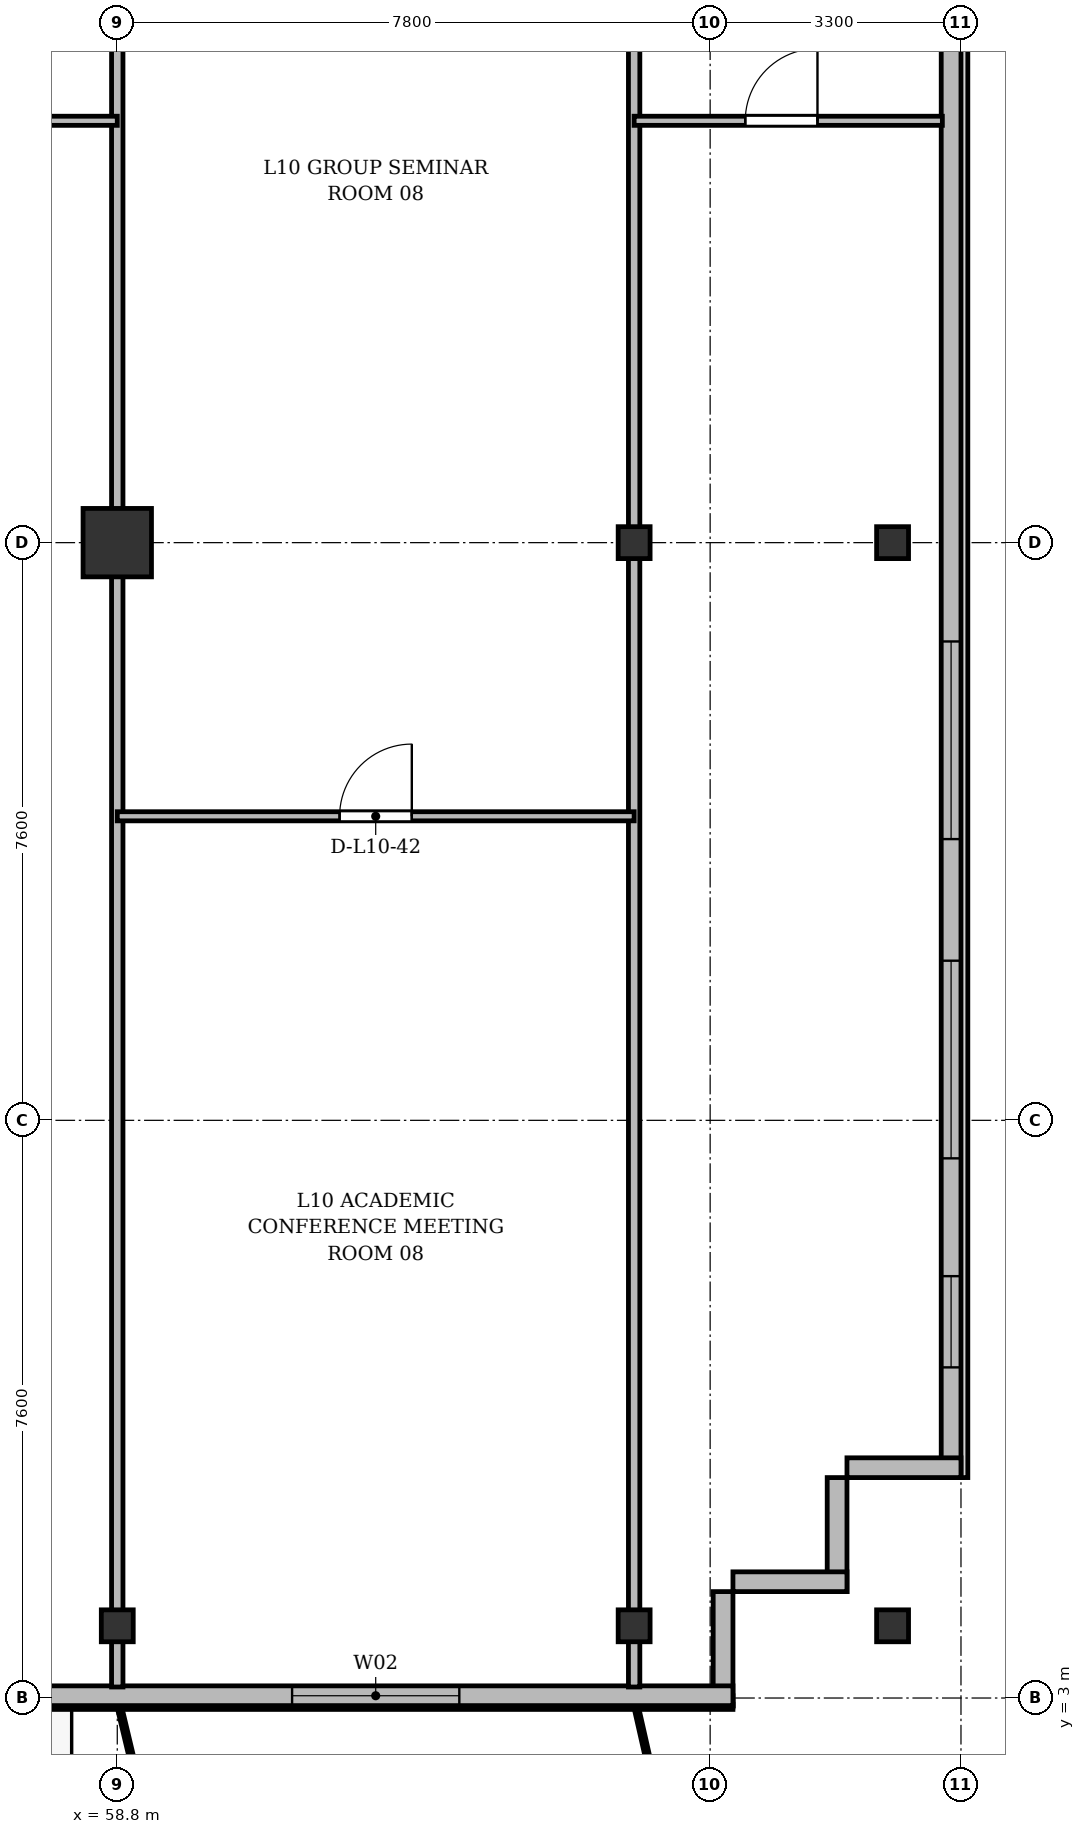
"""IFC4 building model, lengths in metres.
Left out: names, types, materials, properties, quantities, classifications, styles, units other than length and angle.
Written with IfcOpenShell. Run it as: python <this file> out.ifc"""

import sys

from ifc_helpers import new_model, si_unit, direction, frame, frame_2d, origin, origin_2d, place, context, subcontext, project, spatial, rectangle, i_section, extrude, source, transform, mapped, element, fill, save


model = new_model("IFC4")
c1 = context("Model", 3, precision=1e-05, world=origin(), true_north=direction((0.0, 1.0)))
c2 = subcontext(c1, "Body", "Model", "MODEL_VIEW")
j1 = project(units=[si_unit("LENGTHUNIT", "METRE"), si_unit("PLANEANGLEUNIT", "RADIAN")], contexts=[c1])
p1 = place(None, origin())
s1 = spatial("IfcSite", under=j1, at=p1, CompositionType="ELEMENT")
p2 = place(p1, origin())
s2 = spatial("IfcBuilding", under=s1, at=p2, CompositionType="ELEMENT")
p3 = place(p2, frame((0.0, 0.0, 41.5)))
s3 = spatial("IfcBuildingStorey", under=s2, at=p3, CompositionType="ELEMENT", Elevation=41.5)
m1 = source(origin(), c2, "Body", "SweptSolid", [
    extrude(i_section(OverallWidth=0.42, OverallDepth=0.42, WebThickness=0.026, FlangeThickness=0.04, at=origin_2d()), origin(), (0.0, 0.0, 1.0), 3.6),
])
p4 = place(p3, frame((58.8, 3.95, 0.0), z_axis=(0.0, 0.0, 1.0), x_axis=(1.0, 0.0, 0.0)))
e1 = element("IfcColumn", 1, at=p4, inside=s3, PredefinedType="COLUMN", context=c2, shape_type="MappedRepresentation", body=[
    mapped(m1, transform((0.0, 0.0, 0.0), x_axis=(1.0, 0.0, 0.0), y_axis=(0.0, 1.0, 0.0), z_axis=(0.0, 0.0, 1.0), scale=1.0)),
])
m2 = source(origin(), c2, "Body", "SweptSolid", [
    extrude(rectangle(XDim=0.9, YDim=0.9, at=origin_2d()), origin(), (0.0, 0.0, 1.0), 3.6),
])
p5 = place(p3, frame((58.8, 18.2, 0.0), z_axis=(0.0, 0.0, 1.0), x_axis=(1.0, 0.0, 0.0)))
e2 = element("IfcColumn", 2, at=p5, inside=s3, PredefinedType="COLUMN", context=c2, shape_type="MappedRepresentation", body=[
    mapped(m2, transform((0.0, 0.0, 0.0), x_axis=(1.0, 0.0, 0.0), y_axis=(0.0, 1.0, 0.0), z_axis=(0.0, 0.0, 1.0), scale=1.0)),
])
for number, where, z_axis, x_axis in (
    (3, (65.6, 3.95, 0.0), (0.0, 0.0, 1.0), (1.0, 0.0, 0.0)),
    (4, (65.6, 18.2, 0.0), (0.0, 0.0, 1.0), (1.0, 0.0, 0.0)),
    (5, (69.0, 3.95, 0.0), (0.0, 0.0, 1.0), (1.0, 0.0, 0.0)),
    (6, (69.0, 18.2, 0.0), (0.0, 0.0, 1.0), (1.0, 0.0, 0.0)),
):
    element("IfcColumn", number, at=place(p3, frame(where, z_axis=z_axis, x_axis=x_axis)), inside=s3, PredefinedType="COLUMN", context=c2, shape_type="MappedRepresentation", body=[
        mapped(m1, transform((0.0, 0.0, 0.0), x_axis=(1.0, 0.0, 0.0), y_axis=(0.0, 1.0, 0.0), z_axis=(0.0, 0.0, 1.0), scale=1.0)),
    ])
p6 = place(p3, frame((69.77, 45.5, 0.0), z_axis=(0.0, 0.0, 1.0), x_axis=(0.0, -1.0, 0.0)))
e7 = element("IfcWall", 7, at=p6, inside=s3, PredefinedType="SOLIDWALL", context=c2, shape_type="SweptSolid", body=[
    extrude(rectangle(XDim=39.6, YDim=0.26, at=frame_2d((19.8, 0.0))), origin(), (0.0, 0.0, 1.0), 3.34),
])
p7 = place(p6, frame((36.95, 0.0, 0.92)))
e8 = element("IfcOpeningElement", 8, at=p7, cuts=e7, PredefinedType="OPENING", context=c2, shape_type="SweptSolid", body=[
    extrude(rectangle(XDim=1.2, YDim=1.65, at=frame_2d((0.6, 0.825))), frame((0.0, 0.14, 0.0), z_axis=(0.0, -1.0, 0.0), x_axis=(1.0, 0.0, 0.0)), (0.0, 0.0, 1.0), 0.28),
])
p8 = place(p6, frame((32.8, 0.0, 0.92)))
e9 = element("IfcOpeningElement", 9, at=p8, cuts=e7, PredefinedType="OPENING", context=c2, shape_type="SweptSolid", body=[
    extrude(rectangle(XDim=2.6, YDim=1.9, at=frame_2d((1.3, 0.95))), frame((0.0, 0.14, 0.0), z_axis=(0.0, -1.0, 0.0), x_axis=(1.0, 0.0, 0.0)), (0.0, 0.0, 1.0), 0.28),
])
p9 = place(p6, frame((28.6, 0.0, 0.92)))
e10 = element("IfcOpeningElement", 10, at=p9, cuts=e7, PredefinedType="OPENING", context=c2, shape_type="SweptSolid", body=[
    extrude(rectangle(XDim=2.6, YDim=1.9, at=frame_2d((1.3, 0.95))), frame((0.0, 0.14, 0.0), z_axis=(0.0, -1.0, 0.0), x_axis=(1.0, 0.0, 0.0)), (0.0, 0.0, 1.0), 0.28),
])
p10 = place(p6, frame((7.4, 0.0, 0.92)))
e11 = element("IfcOpeningElement", 11, at=p10, cuts=e7, PredefinedType="OPENING", context=c2, shape_type="SweptSolid", body=[
    extrude(rectangle(XDim=2.6, YDim=1.9, at=frame_2d((1.3, 0.95))), frame((0.0, 0.14, 0.0), z_axis=(0.0, -1.0, 0.0), x_axis=(1.0, 0.0, 0.0)), (0.0, 0.0, 1.0), 0.28),
])
p11 = place(p6, frame((4.5, 0.0, 0.92)))
e12 = element("IfcOpeningElement", 12, at=p11, cuts=e7, PredefinedType="OPENING", context=c2, shape_type="SweptSolid", body=[
    extrude(rectangle(XDim=1.2, YDim=1.65, at=frame_2d((0.6, 0.825))), frame((0.0, 0.14, 0.0), z_axis=(0.0, -1.0, 0.0), x_axis=(1.0, 0.0, 0.0)), (0.0, 0.0, 1.0), 0.28),
])
p12 = place(p6, frame((1.15, 0.0, 0.92)))
e13 = element("IfcOpeningElement", 13, at=p12, cuts=e7, PredefinedType="OPENING", context=c2, shape_type="SweptSolid", body=[
    extrude(rectangle(XDim=1.2, YDim=1.65, at=frame_2d((0.6, 0.825))), frame((0.0, 0.14, 0.0), z_axis=(0.0, -1.0, 0.0), x_axis=(1.0, 0.0, 0.0)), (0.0, 0.0, 1.0), 0.28),
])
p13 = place(p3, frame((69.9, 6.03, 0.0), z_axis=(0.0, 0.0, 1.0), x_axis=(-1.0, 0.0, 0.0)))
e14 = element("IfcWall", 14, at=p13, inside=s3, PredefinedType="SOLIDWALL", context=c2, shape_type="SweptSolid", body=[
    extrude(rectangle(XDim=1.5, YDim=0.26, at=frame_2d((0.75, 0.0))), origin(), (0.0, 0.0, 1.0), 2.752),
])
for number, where, z_axis, x_axis in (
    (15, (68.27, 5.9, 0.0), (0.0, 0.0, 1.0), (0.0, -1.0, 0.0)),
    (16, (68.4, 4.53, 0.0), (0.0, 0.0, 1.0), (-1.0, 0.0, 0.0)),
):
    element("IfcWall", number, at=place(p3, frame(where, z_axis=z_axis, x_axis=x_axis)), inside=s3, PredefinedType="SOLIDWALL", context=c2, shape_type="SweptSolid", body=[
        extrude(rectangle(XDim=1.5, YDim=0.26, at=frame_2d((0.75, 0.0))), origin(), (0.0, 0.0, 1.0), 3.34),
    ])
p14 = place(p3, frame((66.77, 4.4, 0.0), z_axis=(0.0, 0.0, 1.0), x_axis=(0.0, -1.0, 0.0)))
e17 = element("IfcWall", 17, at=p14, inside=s3, PredefinedType="SOLIDWALL", context=c2, shape_type="SweptSolid", body=[
    extrude(rectangle(XDim=1.5, YDim=0.26, at=frame_2d((0.75, 0.0))), origin(), (0.0, 0.0, 1.0), 2.69),
])
p15 = place(p3, frame((66.9, 3.03, 0.0), z_axis=(0.0, 0.0, 1.0), x_axis=(-1.0, 0.0, 0.0)))
e18 = element("IfcWall", 18, at=p15, inside=s3, PredefinedType="SOLIDWALL", context=c2, shape_type="SweptSolid", body=[
    extrude(rectangle(XDim=59.4, YDim=0.26, at=frame_2d((29.7, 0.0))), origin(), (0.0, 0.0, 1.0), 3.34),
])
p16 = place(p15, frame((3.6, 0.0, 0.9)))
e19 = element("IfcOpeningElement", 19, at=p16, cuts=e18, PredefinedType="OPENING", context=c2, shape_type="SweptSolid", body=[
    extrude(rectangle(XDim=2.2, YDim=1.8, at=frame_2d((1.1, 0.9))), frame((0.0, 0.14, 0.0), z_axis=(0.0, -1.0, 0.0), x_axis=(1.0, 0.0, 0.0)), (0.0, 0.0, 1.0), 0.28),
])
p17 = place(p15, frame((9.565, 0.0, 0.0)))
e20 = element("IfcOpeningElement", 20, at=p17, cuts=e18, PredefinedType="OPENING", context=c2, shape_type="SweptSolid", body=[
    extrude(rectangle(XDim=1.2, YDim=2.2, at=frame_2d((0.6, 1.1))), frame((0.0, 0.14, 0.0), z_axis=(0.0, -1.0, 0.0), x_axis=(1.0, 0.0, 0.0)), (0.0, 0.0, 1.0), 0.28),
])
p18 = place(p15, frame((18.5, 0.0, 0.9)))
e21 = element("IfcOpeningElement", 21, at=p18, cuts=e18, PredefinedType="OPENING", context=c2, shape_type="SweptSolid", body=[
    extrude(rectangle(XDim=2.0, YDim=1.95, at=frame_2d((1.0, 0.975))), frame((0.0, 0.14, 0.0), z_axis=(0.0, -1.0, 0.0), x_axis=(1.0, 0.0, 0.0)), (0.0, 0.0, 1.0), 0.28),
])
p19 = place(p15, frame((28.875, 0.0, 0.9)))
e22 = element("IfcOpeningElement", 22, at=p19, cuts=e18, PredefinedType="OPENING", context=c2, shape_type="SweptSolid", body=[
    extrude(rectangle(XDim=1.65, YDim=1.85, at=frame_2d((0.825, 0.925))), frame((0.0, 0.14, 0.0), z_axis=(0.0, -1.0, 0.0), x_axis=(1.0, 0.0, 0.0)), (0.0, 0.0, 1.0), 0.28),
])
p20 = place(p15, frame((40.301, 0.0, 0.0)))
e23 = element("IfcOpeningElement", 23, at=p20, cuts=e18, PredefinedType="OPENING", context=c2, shape_type="SweptSolid", body=[
    extrude(rectangle(XDim=1.2, YDim=2.2, at=frame_2d((0.6, 1.1))), frame((0.0, 0.14, 0.0), z_axis=(0.0, -1.0, 0.0), x_axis=(1.0, 0.0, 0.0)), (0.0, 0.0, 1.0), 0.28),
])
p21 = place(p15, frame((46.3, 0.0, 0.9)))
e24 = element("IfcOpeningElement", 24, at=p21, cuts=e18, PredefinedType="OPENING", context=c2, shape_type="SweptSolid", body=[
    extrude(rectangle(XDim=2.2, YDim=1.8, at=frame_2d((1.1, 0.9))), frame((0.0, 0.14, 0.0), z_axis=(0.0, -1.0, 0.0), x_axis=(1.0, 0.0, 0.0)), (0.0, 0.0, 1.0), 0.28),
])
p22 = place(p15, frame((55.817, 0.0, 0.0)))
e25 = element("IfcOpeningElement", 25, at=p22, cuts=e18, PredefinedType="OPENING", context=c2, shape_type="SweptSolid", body=[
    extrude(rectangle(XDim=1.2, YDim=2.2, at=frame_2d((0.6, 1.1))), frame((0.0, 0.14, 0.0), z_axis=(0.0, -1.0, 0.0), x_axis=(1.0, 0.0, 0.0)), (0.0, 0.0, 1.0), 0.28),
])
for number, where, z_axis, x_axis in (
    (26, (58.8, 3.145, 0.0), (0.0, 0.0, 1.0), (0.0, 1.0, 0.0)),
    (27, (65.6, 3.145, 0.0), (0.0, 0.0, 1.0), (0.0, 1.0, 0.0)),
):
    element("IfcWall", number, at=place(p3, frame(where, z_axis=z_axis, x_axis=x_axis)), inside=s3, PredefinedType="PARTITIONING", context=c2, shape_type="SweptSolid", body=[
        extrude(rectangle(XDim=24.455, YDim=0.15, at=frame_2d((12.228, 0.0))), origin(), (0.0, 0.0, 1.0), 2.752),
    ])
p23 = place(p3, frame((51.0, 23.75, 0.0), z_axis=(0.0, 0.0, 1.0), x_axis=(1.0, 0.0, 0.0)))
e28 = element("IfcWall", 28, at=p23, inside=s3, PredefinedType="PARTITIONING", context=c2, shape_type="SweptSolid", body=[
    extrude(rectangle(XDim=7.8, YDim=0.12, at=frame_2d((3.9, 0.0))), origin(), (0.0, 0.0, 1.0), 2.752),
])
p24 = place(p23, frame((3.333, 0.0, 0.0)))
e29 = element("IfcOpeningElement", 29, at=p24, cuts=e28, PredefinedType="OPENING", context=c2, shape_type="SweptSolid", body=[
    extrude(rectangle(XDim=0.95, YDim=2.15, at=frame_2d((0.475, 1.075))), frame((0.0, 0.07, 0.0), z_axis=(0.0, -1.0, 0.0), x_axis=(1.0, 0.0, 0.0)), (0.0, 0.0, 1.0), 0.14),
])
p25 = place(p3, frame((58.8, 14.6, 0.0), z_axis=(0.0, 0.0, 1.0), x_axis=(1.0, 0.0, 0.0)))
e30 = element("IfcWall", 30, at=p25, inside=s3, PredefinedType="PARTITIONING", context=c2, shape_type="SweptSolid", body=[
    extrude(rectangle(XDim=6.8, YDim=0.12, at=frame_2d((3.4, 0.0))), origin(), (0.0, 0.0, 1.0), 2.752),
])
p26 = place(p25, frame((2.925, 0.0, 0.0)))
e31 = element("IfcOpeningElement", 31, at=p26, cuts=e30, PredefinedType="OPENING", context=c2, shape_type="SweptSolid", body=[
    extrude(rectangle(XDim=0.95, YDim=2.15, at=frame_2d((0.475, 1.075))), frame((0.0, 0.07, 0.0), z_axis=(0.0, -1.0, 0.0), x_axis=(1.0, 0.0, 0.0)), (0.0, 0.0, 1.0), 0.14),
])
p27 = place(p3, frame((65.6, 23.75, 0.0), z_axis=(0.0, 0.0, 1.0), x_axis=(1.0, 0.0, 0.0)))
e32 = element("IfcWall", 32, at=p27, inside=s3, PredefinedType="PARTITIONING", context=c2, shape_type="SweptSolid", body=[
    extrude(rectangle(XDim=4.055, YDim=0.12, at=frame_2d((2.027, 0.0))), origin(), (0.0, 0.0, 1.0), 2.752),
])
p28 = place(p27, frame((1.462, 0.0, 0.0)))
e33 = element("IfcOpeningElement", 33, at=p28, cuts=e32, PredefinedType="OPENING", context=c2, shape_type="SweptSolid", body=[
    extrude(rectangle(XDim=0.95, YDim=2.15, at=frame_2d((0.475, 1.075))), frame((0.0, 0.07, 0.0), z_axis=(0.0, -1.0, 0.0), x_axis=(1.0, 0.0, 0.0)), (0.0, 0.0, 1.0), 0.14),
])
m3 = source(origin(), c2, "Body", "SweptSolid", [
    extrude(rectangle(XDim=1.2, YDim=1.65, at=frame_2d((0.6, 0.825))), frame((0.0, 0.03, 0.0), z_axis=(0.0, -1.0, 0.0), x_axis=(1.0, 0.0, 0.0)), (0.0, 0.0, 1.0), 0.06),
])
p29 = place(p7, origin())
e34 = element("IfcWindow", 34, at=p29, inside=s3, PartitioningType="SINGLE_PANEL", PredefinedType="WINDOW", context=c2, shape_type="MappedRepresentation", body=[
    mapped(m3, transform((0.0, 0.0, 0.0), x_axis=(1.0, 0.0, 0.0), y_axis=(0.0, 1.0, 0.0), z_axis=(0.0, 0.0, 1.0), scale=1.0)),
])
fill(e8, e34)
m4 = source(origin(), c2, "Body", "SweptSolid", [
    extrude(rectangle(XDim=2.6, YDim=1.9, at=frame_2d((1.3, 0.95))), frame((0.0, 0.03, 0.0), z_axis=(0.0, -1.0, 0.0), x_axis=(1.0, 0.0, 0.0)), (0.0, 0.0, 1.0), 0.06),
])
p30 = place(p8, origin())
e35 = element("IfcWindow", 35, at=p30, inside=s3, PartitioningType="SINGLE_PANEL", PredefinedType="WINDOW", context=c2, shape_type="MappedRepresentation", body=[
    mapped(m4, transform((0.0, 0.0, 0.0), x_axis=(1.0, 0.0, 0.0), y_axis=(0.0, 1.0, 0.0), z_axis=(0.0, 0.0, 1.0), scale=1.0)),
])
fill(e9, e35)
p31 = place(p9, origin())
e36 = element("IfcWindow", 36, at=p31, inside=s3, PartitioningType="SINGLE_PANEL", PredefinedType="WINDOW", context=c2, shape_type="MappedRepresentation", body=[
    mapped(m4, transform((0.0, 0.0, 0.0), x_axis=(1.0, 0.0, 0.0), y_axis=(0.0, 1.0, 0.0), z_axis=(0.0, 0.0, 1.0), scale=1.0)),
])
fill(e10, e36)
m5 = source(origin(), c2, "Body", "SweptSolid", [
    extrude(rectangle(XDim=2.2, YDim=1.8, at=frame_2d((1.1, 0.9))), frame((0.0, 0.03, 0.0), z_axis=(0.0, -1.0, 0.0), x_axis=(1.0, 0.0, 0.0)), (0.0, 0.0, 1.0), 0.06),
])
p32 = place(p16, origin())
e37 = element("IfcWindow", 37, at=p32, inside=s3, PartitioningType="SINGLE_PANEL", PredefinedType="WINDOW", context=c2, shape_type="MappedRepresentation", body=[
    mapped(m5, transform((0.0, 0.0, 0.0), x_axis=(1.0, 0.0, 0.0), y_axis=(0.0, 1.0, 0.0), z_axis=(0.0, 0.0, 1.0), scale=1.0)),
])
fill(e19, e37)
m6 = source(origin(), c2, "Body", "SweptSolid", [
    extrude(rectangle(XDim=0.95, YDim=2.15, at=frame_2d((0.475, 1.075))), frame((0.0, 0.025, 0.0), z_axis=(0.0, -1.0, 0.0), x_axis=(1.0, 0.0, 0.0)), (0.0, 0.0, 1.0), 0.05),
])
p33 = place(p26, origin())
e38 = element("IfcDoor", 38, at=p33, inside=s3, OperationType="SINGLE_SWING_RIGHT", PredefinedType="DOOR", context=c2, shape_type="MappedRepresentation", body=[
    mapped(m6, transform((0.0, 0.0, 0.0), x_axis=(1.0, 0.0, 0.0), y_axis=(0.0, 1.0, 0.0), z_axis=(0.0, 0.0, 1.0), scale=1.0)),
])
fill(e31, e38)
p34 = place(p28, origin())
e39 = element("IfcDoor", 39, at=p34, inside=s3, OperationType="SINGLE_SWING_RIGHT", PredefinedType="DOOR", context=c2, shape_type="MappedRepresentation", body=[
    mapped(m6, transform((0.0, 0.0, 0.0), x_axis=(1.0, 0.0, 0.0), y_axis=(0.0, 1.0, 0.0), z_axis=(0.0, 0.0, 1.0), scale=1.0)),
])
fill(e33, e39)
save(model, sys.argv[1])
